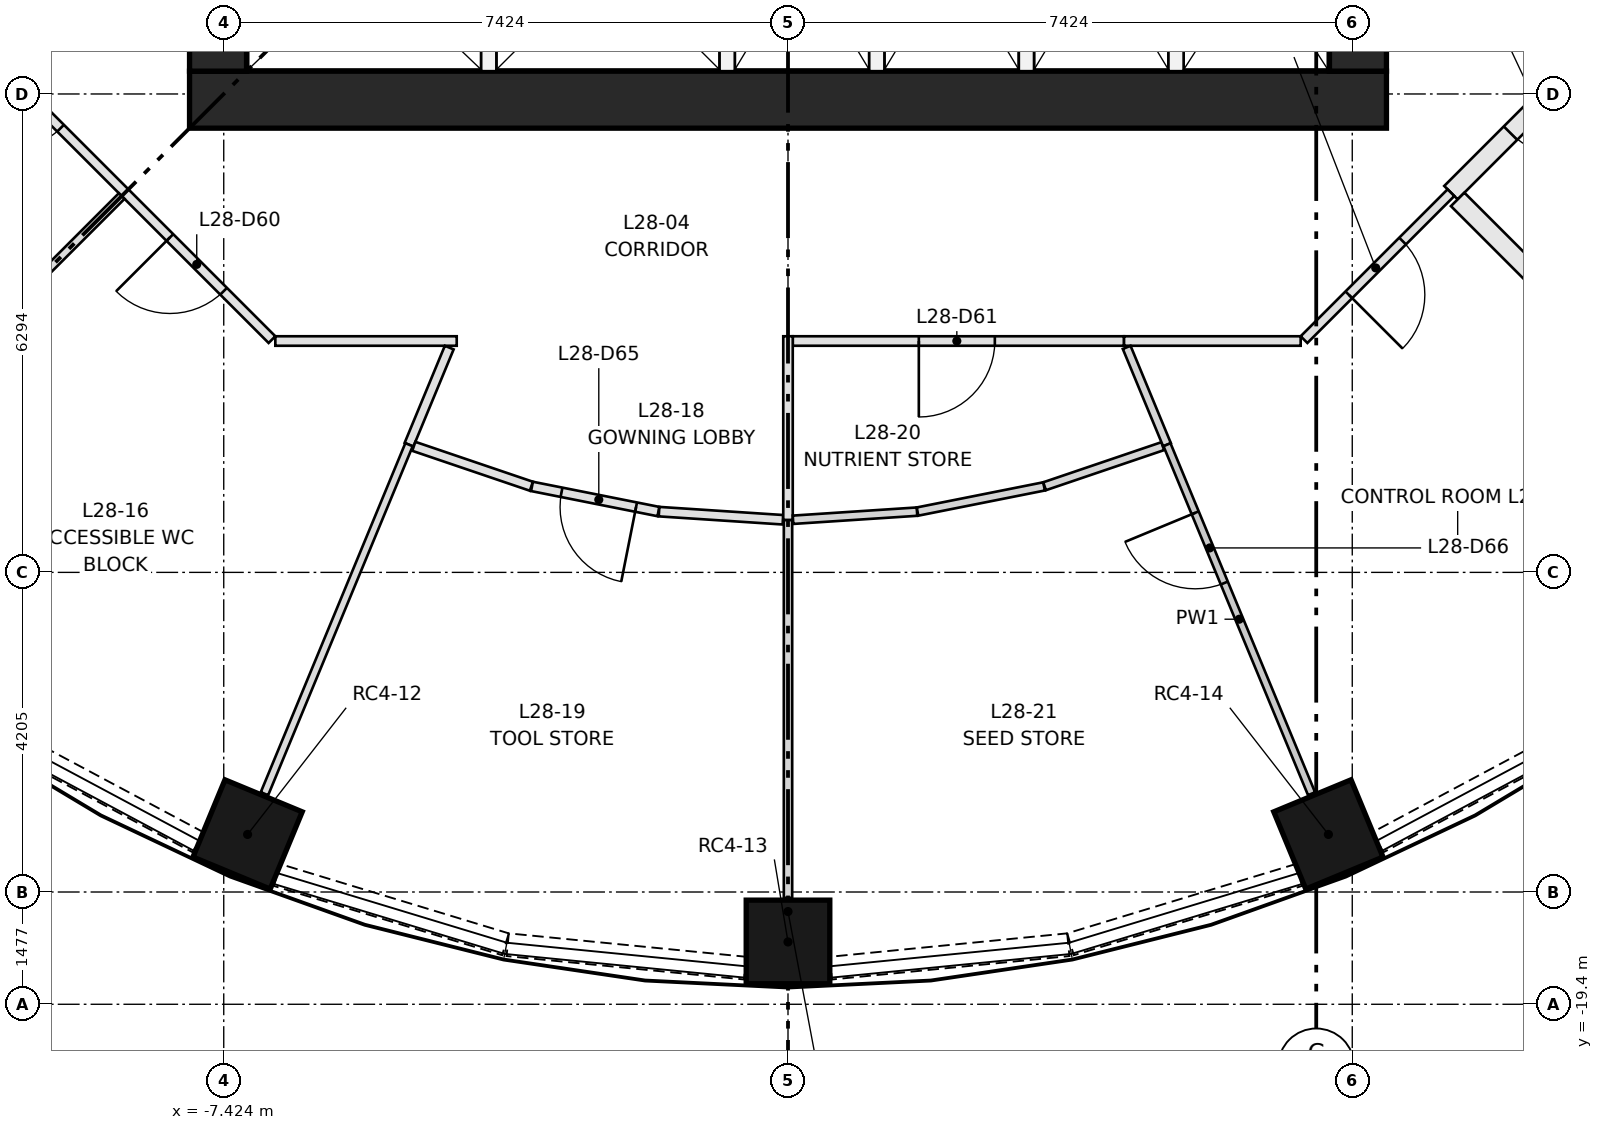
"""IFC4 building model, lengths in metres.
Left out: names, types, materials, properties, quantities, classifications, styles, units other than length and angle.
Written with IfcOpenShell. Run it as: python <this file> out.ifc"""

import sys

from ifc_helpers import new_model, si_unit, direction, frame, frame_2d, origin, origin_2d, place, context, subcontext, project, spatial, rectangle, extrude, element, fill, save


model = new_model("IFC4")
c1 = context("Model", 3, precision=1e-05, world=origin(), true_north=direction((0.0, 1.0)))
c2 = subcontext(c1, "Body", "Model", "MODEL_VIEW")
j1 = project(units=[si_unit("LENGTHUNIT", "METRE"), si_unit("PLANEANGLEUNIT", "RADIAN")], contexts=[c1])
p1 = place(None, origin())
s1 = spatial("IfcSite", under=j1, at=p1, CompositionType="ELEMENT")
p2 = place(p1, origin())
s2 = spatial("IfcBuilding", under=s1, at=p2, CompositionType="ELEMENT")
p3 = place(p2, frame((0.0, 0.0, 109.25)))
s3 = spatial("IfcBuildingStorey", under=s2, at=p3, CompositionType="ELEMENT", Elevation=109.25)
for number, where, z_axis, x_axis in (
    (1, (-7.11, -17.166, 0.0), (0.0, 0.0, 1.0), (-0.383, -0.924, 0.0)),
    (2, (0.0, -18.58, 0.0), (0.0, 0.0, 1.0), (0.0, -1.0, 0.0)),
    (3, (7.11, -17.166, 0.0), (0.0, 0.0, 1.0), (0.383, -0.924, 0.0)),
):
    element("IfcColumn", number, at=place(p3, frame(where, z_axis=z_axis, x_axis=x_axis)), inside=s3, PredefinedType="COLUMN", context=c2, shape_type="SweptSolid", body=[
        extrude(rectangle(XDim=1.1, YDim=1.1, at=origin_2d()), origin(), (0.0, 0.0, 1.0), 3.65),
    ])
p4 = place(p3, frame((-7.874, -7.499, 0.0), z_axis=(0.0, 0.0, 1.0), x_axis=(1.0, 0.0, 0.0)))
e4 = element("IfcWall", 4, at=p4, inside=s3, PredefinedType="SHEAR", context=c2, shape_type="SweptSolid", body=[
    extrude(rectangle(XDim=15.748, YDim=0.75, at=frame_2d((7.874, 0.0))), origin(), (0.0, 0.0, 1.0), 3.65),
])
p5 = place(p3, frame((-7.499, -7.124, 0.0), z_axis=(0.0, 0.0, 1.0), x_axis=(0.0, 1.0, 0.0)))
e5 = element("IfcWall", 5, at=p5, inside=s3, PredefinedType="SHEAR", context=c2, shape_type="SweptSolid", body=[
    extrude(rectangle(XDim=14.248, YDim=0.75, at=frame_2d((7.124, 0.0))), origin(), (0.0, 0.0, 1.0), 3.65),
])
p6 = place(p5, frame((6.624, 0.0, 0.0)))
e6 = element("IfcOpeningElement", 6, at=p6, cuts=e5, PredefinedType="OPENING", context=c2, shape_type="SweptSolid", body=[
    extrude(rectangle(XDim=1.0, YDim=2.1, at=frame_2d((0.5, 1.05))), frame((0.0, 0.385, 0.0), z_axis=(0.0, -1.0, 0.0), x_axis=(1.0, 0.0, 0.0)), (0.0, 0.0, 1.0), 0.77),
])
p7 = place(p5, frame((3.5, 0.0, 0.0)))
e7 = element("IfcOpeningElement", 7, at=p7, cuts=e5, PredefinedType="OPENING", context=c2, shape_type="SweptSolid", body=[
    extrude(rectangle(XDim=1.8, YDim=2.1, at=frame_2d((0.9, 1.05))), frame((0.0, 0.385, 0.0), z_axis=(0.0, -1.0, 0.0), x_axis=(1.0, 0.0, 0.0)), (0.0, 0.0, 1.0), 0.77),
])
p8 = place(p5, frame((8.948, 0.0, 0.0)))
e8 = element("IfcOpeningElement", 8, at=p8, cuts=e5, PredefinedType="OPENING", context=c2, shape_type="SweptSolid", body=[
    extrude(rectangle(XDim=1.8, YDim=2.1, at=frame_2d((0.9, 1.05))), frame((0.0, 0.385, 0.0), z_axis=(0.0, -1.0, 0.0), x_axis=(1.0, 0.0, 0.0)), (0.0, 0.0, 1.0), 0.77),
])
p9 = place(p5, frame((12.124, 0.0, 0.0)))
e9 = element("IfcOpeningElement", 9, at=p9, cuts=e5, PredefinedType="OPENING", context=c2, shape_type="SweptSolid", body=[
    extrude(rectangle(XDim=1.0, YDim=2.1, at=frame_2d((0.5, 1.05))), frame((0.0, 0.385, 0.0), z_axis=(0.0, -1.0, 0.0), x_axis=(1.0, 0.0, 0.0)), (0.0, 0.0, 1.0), 0.77),
])
p10 = place(p3, frame((7.499, -7.124, 0.0), z_axis=(0.0, 0.0, 1.0), x_axis=(0.0, 1.0, 0.0)))
e10 = element("IfcWall", 10, at=p10, inside=s3, PredefinedType="SHEAR", context=c2, shape_type="SweptSolid", body=[
    extrude(rectangle(XDim=14.248, YDim=0.75, at=frame_2d((7.124, 0.0))), origin(), (0.0, 0.0, 1.0), 3.65),
])
p11 = place(p10, frame((6.624, 0.0, 0.0)))
e11 = element("IfcOpeningElement", 11, at=p11, cuts=e10, PredefinedType="OPENING", context=c2, shape_type="SweptSolid", body=[
    extrude(rectangle(XDim=1.0, YDim=2.1, at=frame_2d((0.5, 1.05))), frame((0.0, 0.385, 0.0), z_axis=(0.0, -1.0, 0.0), x_axis=(1.0, 0.0, 0.0)), (0.0, 0.0, 1.0), 0.77),
])
p12 = place(p10, frame((3.5, 0.0, 0.0)))
e12 = element("IfcOpeningElement", 12, at=p12, cuts=e10, PredefinedType="OPENING", context=c2, shape_type="SweptSolid", body=[
    extrude(rectangle(XDim=1.8, YDim=2.1, at=frame_2d((0.9, 1.05))), frame((0.0, 0.385, 0.0), z_axis=(0.0, -1.0, 0.0), x_axis=(1.0, 0.0, 0.0)), (0.0, 0.0, 1.0), 0.77),
])
p13 = place(p10, frame((8.948, 0.0, 0.0)))
e13 = element("IfcOpeningElement", 13, at=p13, cuts=e10, PredefinedType="OPENING", context=c2, shape_type="SweptSolid", body=[
    extrude(rectangle(XDim=1.8, YDim=2.1, at=frame_2d((0.9, 1.05))), frame((0.0, 0.385, 0.0), z_axis=(0.0, -1.0, 0.0), x_axis=(1.0, 0.0, 0.0)), (0.0, 0.0, 1.0), 0.77),
])
for number, where, z_axis, x_axis in (
    (14, (-3.937, -7.124, 0.0), (0.0, 0.0, 1.0), (0.0, 1.0, 0.0)),
    (15, (-0.8, -7.124, 0.0), (0.0, 0.0, 1.0), (0.0, 1.0, 0.0)),
    (16, (1.168, -7.124, 0.0), (0.0, 0.0, 1.0), (0.0, 1.0, 0.0)),
    (17, (3.137, -7.124, 0.0), (0.0, 0.0, 1.0), (0.0, 1.0, 0.0)),
    (18, (5.105, -7.124, 0.0), (0.0, 0.0, 1.0), (0.0, 1.0, 0.0)),
):
    element("IfcWall", number, at=place(p3, frame(where, z_axis=z_axis, x_axis=x_axis)), inside=s3, PredefinedType="PARTITIONING", context=c2, shape_type="SweptSolid", body=[
        extrude(rectangle(XDim=2.95, YDim=0.2, at=frame_2d((1.475, 0.0))), origin(), (0.0, 0.0, 1.0), 3.3),
    ])
p14 = place(p3, frame((-10.532, -15.788, 0.0), z_axis=(0.0, 0.0, 1.0), x_axis=(0.88193278355, -0.471375185282, 0.0)))
e19 = element("IfcWall", 19, at=p14, inside=s3, PredefinedType="SOLIDWALL", context=c2, shape_type="SweptSolid", body=[
    extrude(rectangle(XDim=3.139, YDim=0.3, at=frame_2d((1.57, 0.0))), origin(), (0.0, 0.0, 1.0), 0.9),
])
p15 = place(p3, frame((-6.722, -17.699, 0.0), z_axis=(0.0, 0.0, 1.0), x_axis=(0.956961595403, -0.290214584271, 0.0)))
e20 = element("IfcWall", 20, at=p15, inside=s3, PredefinedType="SOLIDWALL", context=c2, shape_type="SweptSolid", body=[
    extrude(rectangle(XDim=3.139, YDim=0.3, at=frame_2d((1.57, 0.0))), origin(), (0.0, 0.0, 1.0), 0.9),
])
for number, where, z_axis, x_axis in (
    (21, (-3.688, -18.616, 0.0), (0.0, 0.0, 1.0), (0.995, -0.098, 0.0)),
    (22, (0.564, -18.925, 0.0), (0.0, 0.0, 1.0), (0.995, 0.098, 0.0)),
):
    element("IfcWall", number, at=place(p3, frame(where, z_axis=z_axis, x_axis=x_axis)), inside=s3, PredefinedType="SOLIDWALL", context=c2, shape_type="SweptSolid", body=[
        extrude(rectangle(XDim=3.139, YDim=0.3, at=frame_2d((1.57, 0.0))), origin(), (0.0, 0.0, 1.0), 0.9),
    ])
p16 = place(p3, frame((3.717, -18.611, 0.0), z_axis=(0.0, 0.0, 1.0), x_axis=(0.956961595403, 0.290214584271, 0.0)))
e23 = element("IfcWall", 23, at=p16, inside=s3, PredefinedType="SOLIDWALL", context=c2, shape_type="SweptSolid", body=[
    extrude(rectangle(XDim=3.139, YDim=0.3, at=frame_2d((1.57, 0.0))), origin(), (0.0, 0.0, 1.0), 0.9),
])
p17 = place(p3, frame((7.763, -17.268, 0.0), z_axis=(0.0, 0.0, 1.0), x_axis=(0.88193278355, 0.471375185282, 0.0)))
e24 = element("IfcWall", 24, at=p17, inside=s3, PredefinedType="SOLIDWALL", context=c2, shape_type="SweptSolid", body=[
    extrude(rectangle(XDim=3.139, YDim=0.3, at=frame_2d((1.57, 0.0))), origin(), (0.0, 0.0, 1.0), 0.9),
])
p18 = place(p3, frame((10.637, -6.808, 0.0), z_axis=(0.0, 0.0, 1.0), x_axis=(-0.707151855722, -0.707061703777, 0.0)))
e25 = element("IfcWall", 25, at=p18, inside=s3, PredefinedType="PARTITIONING", context=c2, shape_type="SweptSolid", body=[
    extrude(rectangle(XDim=2.708, YDim=0.25, at=frame_2d((1.354, 0.0))), origin(), (0.0, 0.0, 1.0), 3.3),
])
p19 = place(p18, frame((0.6, 0.0, 0.0)))
e26 = element("IfcOpeningElement", 26, at=p19, cuts=e25, PredefinedType="OPENING", context=c2, shape_type="SweptSolid", body=[
    extrude(rectangle(XDim=1.0, YDim=2.1, at=frame_2d((0.5, 1.05))), frame((0.0, 0.135, 0.0), z_axis=(0.0, -1.0, 0.0), x_axis=(1.0, 0.0, 0.0)), (0.0, 0.0, 1.0), 0.27),
])
p20 = place(p3, frame((-8.722, -8.722, 0.0), z_axis=(0.0, 0.0, 1.0), x_axis=(-0.707151428813, 0.707062130741, 0.0)))
e27 = element("IfcWall", 27, at=p20, inside=s3, PredefinedType="PARTITIONING", context=c2, shape_type="SweptSolid", body=[
    extrude(rectangle(XDim=2.734, YDim=0.125, at=frame_2d((1.367, 0.0))), origin(), (0.0, 0.0, 1.0), 3.3),
])
p21 = place(p20, frame((1.2, 0.0, 0.0)))
e28 = element("IfcOpeningElement", 28, at=p21, cuts=e27, PredefinedType="OPENING", context=c2, shape_type="SweptSolid", body=[
    extrude(rectangle(XDim=1.0, YDim=2.1, at=frame_2d((0.5, 1.05))), frame((0.0, 0.073, 0.0), z_axis=(0.0, -1.0, 0.0), x_axis=(1.0, 0.0, 0.0)), (0.0, 0.0, 1.0), 0.145),
])
p22 = place(p3, frame((-6.789, -10.656, 0.0), z_axis=(0.0, 0.0, 1.0), x_axis=(-0.707062130741, 0.707151428813, 0.0)))
e29 = element("IfcWall", 29, at=p22, inside=s3, PredefinedType="PARTITIONING", context=c2, shape_type="SweptSolid", body=[
    extrude(rectangle(XDim=2.734, YDim=0.125, at=frame_2d((1.367, 0.0))), origin(), (0.0, 0.0, 1.0), 3.3),
])
p23 = place(p22, frame((0.9, 0.0, 0.0)))
e30 = element("IfcOpeningElement", 30, at=p23, cuts=e29, PredefinedType="OPENING", context=c2, shape_type="SweptSolid", body=[
    extrude(rectangle(XDim=1.0, YDim=2.1, at=frame_2d((0.5, 1.05))), frame((0.0, 0.073, 0.0), z_axis=(0.0, -1.0, 0.0), x_axis=(1.0, 0.0, 0.0)), (0.0, 0.0, 1.0), 0.145),
])
p24 = place(p3, frame((-4.359, -10.674, 0.0), z_axis=(0.0, 0.0, 1.0), x_axis=(-1.0, 0.0, 0.0)))
e31 = element("IfcWall", 31, at=p24, inside=s3, PredefinedType="PARTITIONING", context=c2, shape_type="SweptSolid", body=[
    extrude(rectangle(XDim=2.386, YDim=0.125, at=frame_2d((1.193, 0.0))), origin(), (0.0, 0.0, 1.0), 3.3),
])
p25 = place(p3, frame((4.421, -10.674, 0.0), z_axis=(0.0, 0.0, 1.0), x_axis=(-1.0, 0.0, 0.0)))
e32 = element("IfcWall", 32, at=p25, inside=s3, PredefinedType="PARTITIONING", context=c2, shape_type="SweptSolid", body=[
    extrude(rectangle(XDim=4.359, YDim=0.125, at=frame_2d((2.179, 0.0))), origin(), (0.0, 0.0, 1.0), 3.3),
])
p26 = place(p25, frame((1.7, 0.0, 0.0)))
e33 = element("IfcOpeningElement", 33, at=p26, cuts=e32, PredefinedType="OPENING", context=c2, shape_type="SweptSolid", body=[
    extrude(rectangle(XDim=1.0, YDim=2.1, at=frame_2d((0.5, 1.05))), frame((0.0, 0.073, 0.0), z_axis=(0.0, -1.0, 0.0), x_axis=(1.0, 0.0, 0.0)), (0.0, 0.0, 1.0), 0.145),
])
p27 = place(p3, frame((6.745, -10.674, 0.0), z_axis=(0.0, 0.0, 1.0), x_axis=(-1.0, 0.0, 0.0)))
e34 = element("IfcWall", 34, at=p27, inside=s3, PredefinedType="PARTITIONING", context=c2, shape_type="SweptSolid", body=[
    extrude(rectangle(XDim=2.324, YDim=0.125, at=frame_2d((1.162, 0.0))), origin(), (0.0, 0.0, 1.0), 3.3),
])
p28 = place(p3, frame((8.722, -8.722, 0.0), z_axis=(0.0, 0.0, 1.0), x_axis=(-0.707062130741, -0.707151428813, 0.0)))
e35 = element("IfcWall", 35, at=p28, inside=s3, PredefinedType="PARTITIONING", context=c2, shape_type="SweptSolid", body=[
    extrude(rectangle(XDim=2.734, YDim=0.125, at=frame_2d((1.367, 0.0))), origin(), (0.0, 0.0, 1.0), 3.3),
])
p29 = place(p28, frame((0.9, 0.0, 0.0)))
e36 = element("IfcOpeningElement", 36, at=p29, cuts=e35, PredefinedType="OPENING", context=c2, shape_type="SweptSolid", body=[
    extrude(rectangle(XDim=1.0, YDim=2.1, at=frame_2d((0.5, 1.05))), frame((0.0, 0.073, 0.0), z_axis=(0.0, -1.0, 0.0), x_axis=(1.0, 0.0, 0.0)), (0.0, 0.0, 1.0), 0.145),
])
p30 = place(p3, frame((-12.728, -12.728, 0.0), z_axis=(0.0, 0.0, 1.0), x_axis=(0.707106781187, 0.707106781187, 0.0)))
e37 = element("IfcWall", 37, at=p30, inside=s3, PredefinedType="PARTITIONING", context=c2, shape_type="SweptSolid", body=[
    extrude(rectangle(XDim=5.602, YDim=0.105, at=frame_2d((2.801, 0.0))), origin(), (0.0, 0.0, 1.0), 3.3),
])
p31 = place(p3, frame((-4.457, -10.76, 0.0), z_axis=(0.0, 0.0, 1.0), x_axis=(-0.382746785562, -0.923853288213, 0.0)))
e38 = element("IfcWall", 38, at=p31, inside=s3, PredefinedType="PARTITIONING", context=c2, shape_type="SweptSolid", body=[
    extrude(rectangle(XDim=1.383, YDim=0.125, at=frame_2d((0.691, 0.0))), origin(), (0.0, 0.0, 1.0), 3.3),
])
p32 = place(p3, frame((-4.986, -12.038, 0.0), z_axis=(0.0, 0.0, 1.0), x_axis=(-0.38266126553, -0.923888714003, 0.0)))
e39 = element("IfcWall", 39, at=p32, inside=s3, PredefinedType="PARTITIONING", context=c2, shape_type="SweptSolid", body=[
    extrude(rectangle(XDim=4.97, YDim=0.105, at=frame_2d((2.485, 0.0))), origin(), (0.0, 0.0, 1.0), 3.3),
])
p33 = place(p3, frame((-3.376, -12.585, 0.0), z_axis=(0.0, 0.0, 1.0), x_axis=(-0.946920220616, 0.321468654442, 0.0)))
e40 = element("IfcWall", 40, at=p33, inside=s3, PredefinedType="PARTITIONING", context=c2, shape_type="SweptSolid", body=[
    extrude(rectangle(XDim=1.634, YDim=0.125, at=frame_2d((0.817, 0.0))), origin(), (0.0, 0.0, 1.0), 3.3),
])
p34 = place(p3, frame((-1.705, -12.918, 0.0), z_axis=(0.0, 0.0, 1.0), x_axis=(-0.980795988991, 0.195036478586, 0.0)))
e41 = element("IfcWall", 41, at=p34, inside=s3, PredefinedType="PARTITIONING", context=c2, shape_type="SweptSolid", body=[
    extrude(rectangle(XDim=1.696, YDim=0.125, at=frame_2d((0.848, 0.0))), origin(), (0.0, 0.0, 1.0), 3.3),
])
p35 = place(p34, frame((0.3, 0.0, 0.0)))
e42 = element("IfcOpeningElement", 42, at=p35, cuts=e41, PredefinedType="OPENING", context=c2, shape_type="SweptSolid", body=[
    extrude(rectangle(XDim=1.0, YDim=2.1, at=frame_2d((0.5, 1.05))), frame((0.0, 0.073, 0.0), z_axis=(0.0, -1.0, 0.0), x_axis=(1.0, 0.0, 0.0)), (0.0, 0.0, 1.0), 0.145),
])
p36 = place(p3, frame((-0.067, -13.026, 0.0), z_axis=(0.0, 0.0, 1.0), x_axis=(-0.997855349109, 0.065457637099, 0.0)))
e43 = element("IfcWall", 43, at=p36, inside=s3, PredefinedType="PARTITIONING", context=c2, shape_type="SweptSolid", body=[
    extrude(rectangle(XDim=1.634, YDim=0.125, at=frame_2d((0.817, 0.0))), origin(), (0.0, 0.0, 1.0), 3.3),
])
p37 = place(p3, frame((0.0, -10.612, 0.0), z_axis=(0.0, 0.0, 1.0), x_axis=(0.0, -1.0, 0.0)))
e44 = element("IfcWall", 44, at=p37, inside=s3, PredefinedType="PARTITIONING", context=c2, shape_type="SweptSolid", body=[
    extrude(rectangle(XDim=2.418, YDim=0.125, at=frame_2d((1.209, 0.0))), origin(), (0.0, 0.0, 1.0), 3.3),
])
p38 = place(p3, frame((0.0, -13.03, 0.0), z_axis=(0.0, 0.0, 1.0), x_axis=(0.0, -1.0, 0.0)))
e45 = element("IfcWall", 45, at=p38, inside=s3, PredefinedType="PARTITIONING", context=c2, shape_type="SweptSolid", body=[
    extrude(rectangle(XDim=4.97, YDim=0.11, at=frame_2d((2.485, 0.0))), origin(), (0.0, 0.0, 1.0), 3.3),
])
p39 = place(p3, frame((1.697, -12.919, 0.0), z_axis=(0.0, 0.0, 1.0), x_axis=(-0.997857908157, -0.065418614545, 0.0)))
e46 = element("IfcWall", 46, at=p39, inside=s3, PredefinedType="PARTITIONING", context=c2, shape_type="SweptSolid", body=[
    extrude(rectangle(XDim=1.635, YDim=0.11, at=frame_2d((0.817, 0.0))), origin(), (0.0, 0.0, 1.0), 3.3),
])
p40 = place(p3, frame((3.369, -12.587, 0.0), z_axis=(0.0, 0.0, 1.0), x_axis=(-0.980790359024, -0.19506478833, 0.0)))
e47 = element("IfcWall", 47, at=p40, inside=s3, PredefinedType="PARTITIONING", context=c2, shape_type="SweptSolid", body=[
    extrude(rectangle(XDim=1.697, YDim=0.11, at=frame_2d((0.849, 0.0))), origin(), (0.0, 0.0, 1.0), 3.3),
])
p41 = place(p3, frame((4.931, -12.057, 0.0), z_axis=(0.0, 0.0, 1.0), x_axis=(-0.946990007889, -0.321263015235, 0.0)))
e48 = element("IfcWall", 48, at=p41, inside=s3, PredefinedType="PARTITIONING", context=c2, shape_type="SweptSolid", body=[
    extrude(rectangle(XDim=1.642, YDim=0.11, at=frame_2d((0.821, 0.0))), origin(), (0.0, 0.0, 1.0), 3.3),
])
p42 = place(p3, frame((4.456, -10.758, 0.0), z_axis=(0.0, 0.0, 1.0), x_axis=(0.382751066095, -0.923851514803, 0.0)))
e49 = element("IfcWall", 49, at=p42, inside=s3, PredefinedType="PARTITIONING", context=c2, shape_type="SweptSolid", body=[
    extrude(rectangle(XDim=1.386, YDim=0.11, at=frame_2d((0.693, 0.0))), origin(), (0.0, 0.0, 1.0), 3.3),
])
p43 = place(p3, frame((6.888, -16.63, 0.0), z_axis=(0.0, 0.0, 1.0), x_axis=(-0.38266126553, 0.923888714003, 0.0)))
e50 = element("IfcWall", 50, at=p43, inside=s3, PredefinedType="PARTITIONING", context=c2, shape_type="SweptSolid", body=[
    extrude(rectangle(XDim=4.97, YDim=0.1, at=frame_2d((2.485, 0.0))), origin(), (0.0, 0.0, 1.0), 3.3),
])
p44 = place(p43, frame((3.0, 0.0, 0.0)))
e51 = element("IfcOpeningElement", 51, at=p44, cuts=e50, PredefinedType="OPENING", context=c2, shape_type="SweptSolid", body=[
    extrude(rectangle(XDim=1.0, YDim=2.1, at=frame_2d((0.5, 1.05))), frame((0.0, 0.06, 0.0), z_axis=(0.0, -1.0, 0.0), x_axis=(1.0, 0.0, 0.0)), (0.0, 0.0, 1.0), 0.12),
])
p45 = place(p3, frame((8.811, -8.811, 0.0), z_axis=(0.0, 0.0, 1.0), x_axis=(0.707106781187, -0.707106781187, 0.0)))
e52 = element("IfcWall", 52, at=p45, inside=s3, PredefinedType="PARTITIONING", context=c2, shape_type="SweptSolid", body=[
    extrude(rectangle(XDim=5.54, YDim=0.25, at=frame_2d((2.77, 0.0))), origin(), (0.0, 0.0, 1.0), 3.3),
])
p46 = place(p19, origin())
e53 = element("IfcDoor", 53, at=p46, inside=s3, OperationType="SINGLE_SWING_LEFT", PredefinedType="DOOR", context=c2, shape_type="SweptSolid", body=[
    extrude(rectangle(XDim=1.0, YDim=2.1, at=frame_2d((0.5, 1.05))), frame((0.0, 0.025, 0.0), z_axis=(0.0, -1.0, 0.0), x_axis=(1.0, 0.0, 0.0)), (0.0, 0.0, 1.0), 0.05),
])
fill(e26, e53)
p47 = place(p21, origin())
e54 = element("IfcDoor", 54, at=p47, inside=s3, OperationType="SINGLE_SWING_RIGHT", PredefinedType="DOOR", context=c2, shape_type="SweptSolid", body=[
    extrude(rectangle(XDim=1.0, YDim=2.1, at=frame_2d((0.5, 1.05))), frame((0.0, 0.025, 0.0), z_axis=(0.0, -1.0, 0.0), x_axis=(1.0, 0.0, 0.0)), (0.0, 0.0, 1.0), 0.05),
])
fill(e28, e54)
p48 = place(p23, origin())
e55 = element("IfcDoor", 55, at=p48, inside=s3, OperationType="SINGLE_SWING_RIGHT", PredefinedType="DOOR", context=c2, shape_type="SweptSolid", body=[
    extrude(rectangle(XDim=1.0, YDim=2.1, at=frame_2d((0.5, 1.05))), frame((0.0, 0.025, 0.0), z_axis=(0.0, -1.0, 0.0), x_axis=(1.0, 0.0, 0.0)), (0.0, 0.0, 1.0), 0.05),
])
fill(e30, e55)
p49 = place(p26, origin())
e56 = element("IfcDoor", 56, at=p49, inside=s3, OperationType="SINGLE_SWING_RIGHT", PredefinedType="DOOR", context=c2, shape_type="SweptSolid", body=[
    extrude(rectangle(XDim=1.0, YDim=2.1, at=frame_2d((0.5, 1.05))), frame((0.0, 0.025, 0.0), z_axis=(0.0, -1.0, 0.0), x_axis=(1.0, 0.0, 0.0)), (0.0, 0.0, 1.0), 0.05),
])
fill(e33, e56)
p50 = place(p29, origin())
e57 = element("IfcDoor", 57, at=p50, inside=s3, OperationType="SINGLE_SWING_RIGHT", PredefinedType="DOOR", context=c2, shape_type="SweptSolid", body=[
    extrude(rectangle(XDim=1.0, YDim=2.1, at=frame_2d((0.5, 1.05))), frame((0.0, 0.025, 0.0), z_axis=(0.0, -1.0, 0.0), x_axis=(1.0, 0.0, 0.0)), (0.0, 0.0, 1.0), 0.05),
])
fill(e36, e57)
p51 = place(p35, origin())
e58 = element("IfcDoor", 58, at=p51, inside=s3, OperationType="SINGLE_SWING_LEFT", PredefinedType="DOOR", context=c2, shape_type="SweptSolid", body=[
    extrude(rectangle(XDim=1.0, YDim=2.1, at=frame_2d((0.5, 1.05))), frame((0.0, 0.025, 0.0), z_axis=(0.0, -1.0, 0.0), x_axis=(1.0, 0.0, 0.0)), (0.0, 0.0, 1.0), 0.05),
])
fill(e42, e58)
p52 = place(p44, origin())
e59 = element("IfcDoor", 59, at=p52, inside=s3, OperationType="SINGLE_SWING_RIGHT", PredefinedType="DOOR", context=c2, shape_type="SweptSolid", body=[
    extrude(rectangle(XDim=1.0, YDim=2.1, at=frame_2d((0.5, 1.05))), frame((0.0, 0.025, 0.0), z_axis=(0.0, -1.0, 0.0), x_axis=(1.0, 0.0, 0.0)), (0.0, 0.0, 1.0), 0.05),
])
fill(e51, e59)
save(model, sys.argv[1])
